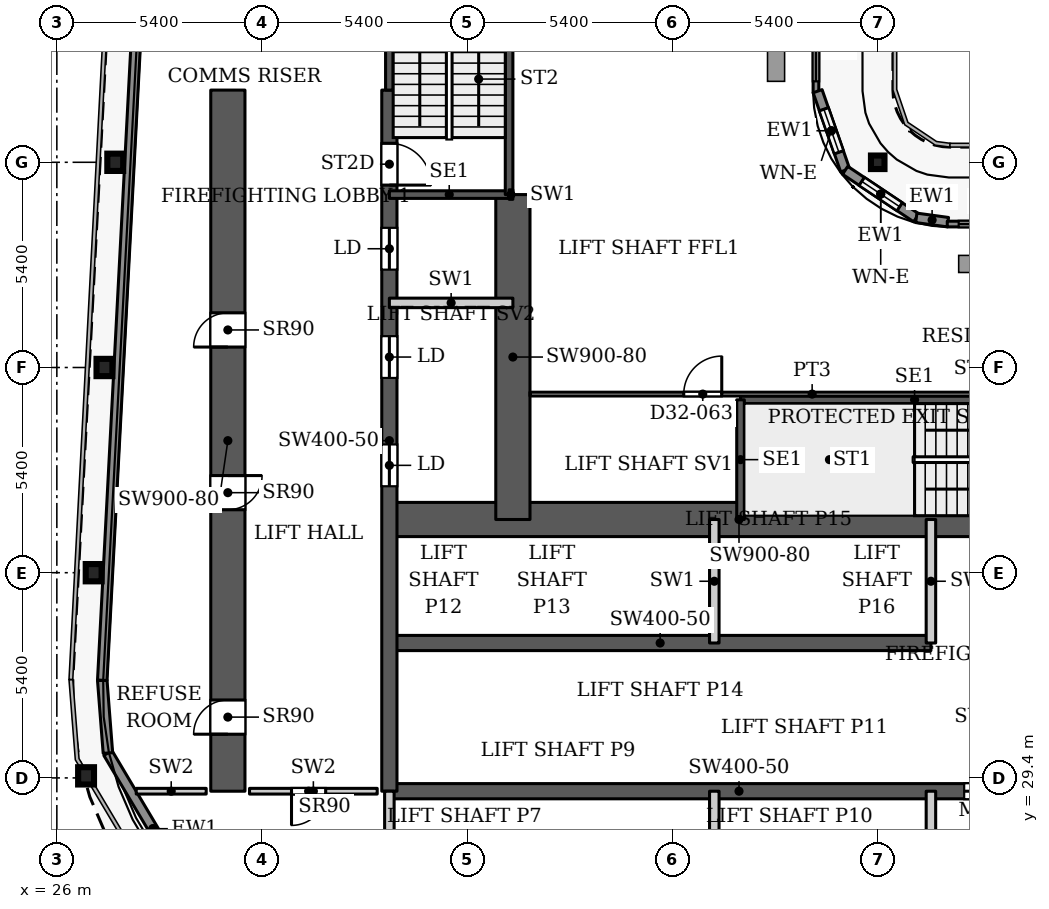
"""IFC4 building model, lengths in metres.
Left out: names, types, materials, properties, quantities, classifications, styles, units other than length and angle.
Written with IfcOpenShell. Run it as: python <this file> out.ifc"""

import sys

from ifc_helpers import new_model, si_unit, direction, frame, frame_2d, origin, origin_2d, place, context, subcontext, project, spatial, rectangle, hollow_rectangle, i_section, extrude, source, transform, mapped, element, fill, save


model = new_model("IFC4")
c1 = context("Model", 3, precision=1e-05, world=origin(), true_north=direction((0.0, 1.0)))
c2 = subcontext(c1, "Body", "Model", "MODEL_VIEW")
j1 = project(units=[si_unit("LENGTHUNIT", "METRE"), si_unit("PLANEANGLEUNIT", "RADIAN")], contexts=[c1])
p1 = place(None, origin())
s1 = spatial("IfcSite", under=j1, at=p1, CompositionType="ELEMENT")
p2 = place(p1, origin())
s2 = spatial("IfcBuilding", under=s1, at=p2, CompositionType="ELEMENT")
p3 = place(p2, frame((0.0, 0.0, 137.0)))
s3 = spatial("IfcBuildingStorey", under=s2, at=p3, CompositionType="ELEMENT", Elevation=137.0)
for number, where, z_axis, x_axis in (
    (1, (26.769, 29.454, 0.0), (0.0, 0.0, 1.0), (1.0, 0.0, 0.0)),
    (2, (26.969, 34.8, 0.0), (0.0, 0.0, 1.0), (1.0, 0.0, 0.0)),
    (3, (27.253, 40.2, 0.0), (0.0, 0.0, 1.0), (1.0, 0.0, 0.0)),
    (4, (27.537, 45.6, 0.0), (0.0, 0.0, 1.0), (1.0, 0.0, 0.0)),
):
    element("IfcColumn", number, at=place(p3, frame(where, z_axis=z_axis, x_axis=x_axis)), inside=s3, PredefinedType="COLUMN", context=c2, shape_type="SweptSolid", body=[
        extrude(i_section(OverallWidth=0.418, OverallDepth=0.455, WebThickness=0.042, FlangeThickness=0.068, FilletRadius=0.014, at=origin_2d()), origin(), (0.0, 0.0, 1.0), 3.9),
    ])
p4 = place(p3, frame((47.6, 45.6, 0.0), z_axis=(0.0, 0.0, 1.0), x_axis=(1.0, 0.0, 0.0)))
e5 = element("IfcColumn", 5, at=p4, inside=s3, PredefinedType="COLUMN", context=c2, shape_type="SweptSolid", body=[
    extrude(hollow_rectangle(XDim=0.356, YDim=0.356, WallThickness=0.016, InnerFilletRadius=0.016, OuterFilletRadius=0.032, at=origin_2d()), origin(), (0.0, 0.0, 1.0), 3.9),
])
p5 = place(p3, frame((34.75, 29.05, 0.0), z_axis=(0.0, 0.0, 1.0), x_axis=(1.0, 0.0, 0.0)))
e6 = element("IfcWall", 6, at=p5, inside=s3, PredefinedType="SHEAR", context=c2, shape_type="SweptSolid", body=[
    extrude(rectangle(XDim=18.4, YDim=0.4, at=frame_2d((9.2, 0.0))), origin(), (0.0, 0.0, 1.0), 3.9),
])
p6 = place(p5, frame((15.125, 0.0, 0.0)))
e7 = element("IfcOpeningElement", 7, at=p6, cuts=e6, PredefinedType="OPENING", context=c2, shape_type="SweptSolid", body=[
    extrude(rectangle(XDim=1.1, YDim=2.2, at=frame_2d((0.55, 1.1))), frame((0.0, 0.21, 0.0), z_axis=(0.0, -1.0, 0.0), x_axis=(1.0, 0.0, 0.0)), (0.0, 0.0, 1.0), 0.42),
])
p7 = place(p3, frame((34.75, 32.95, 0.0), z_axis=(0.0, 0.0, 1.0), x_axis=(1.0, 0.0, 0.0)))
e8 = element("IfcWall", 8, at=p7, inside=s3, PredefinedType="SHEAR", context=c2, shape_type="SweptSolid", body=[
    extrude(rectangle(XDim=14.25, YDim=0.4, at=frame_2d((7.125, 0.0))), origin(), (0.0, 0.0, 1.0), 3.9),
])
p8 = place(p3, frame((34.75, 36.2, 0.0), z_axis=(0.0, 0.0, 1.0), x_axis=(1.0, 0.0, 0.0)))
e9 = element("IfcWall", 9, at=p8, inside=s3, PredefinedType="SHEAR", context=c2, shape_type="SweptSolid", body=[
    extrude(rectangle(XDim=18.4, YDim=0.9, at=frame_2d((9.2, 0.0))), origin(), (0.0, 0.0, 1.0), 3.9),
])
p9 = place(p8, frame((16.9, 0.0, 0.0)))
e10 = element("IfcOpeningElement", 10, at=p9, cuts=e9, PredefinedType="OPENING", context=c2, shape_type="SweptSolid", body=[
    extrude(rectangle(XDim=1.0, YDim=2.2, at=frame_2d((0.5, 1.1))), frame((0.0, 0.46, 0.0), z_axis=(0.0, -1.0, 0.0), x_axis=(1.0, 0.0, 0.0)), (0.0, 0.0, 1.0), 0.92),
])
p10 = place(p3, frame((34.75, 29.05, 0.0), z_axis=(0.0, 0.0, 1.0), x_axis=(0.0, 1.0, 0.0)))
e11 = element("IfcWall", 11, at=p10, inside=s3, PredefinedType="SHEAR", context=c2, shape_type="SweptSolid", body=[
    extrude(rectangle(XDim=18.45, YDim=0.4, at=frame_2d((9.225, 0.0))), origin(), (0.0, 0.0, 1.0), 3.9),
])
p11 = place(p10, frame((8.025, 0.0, 0.0)))
e12 = element("IfcOpeningElement", 12, at=p11, cuts=e11, PredefinedType="OPENING", context=c2, shape_type="SweptSolid", body=[
    extrude(rectangle(XDim=1.1, YDim=2.2, at=frame_2d((0.55, 1.1))), frame((0.0, 0.21, 0.0), z_axis=(0.0, -1.0, 0.0), x_axis=(1.0, 0.0, 0.0)), (0.0, 0.0, 1.0), 0.42),
])
p12 = place(p10, frame((10.875, 0.0, 0.0)))
e13 = element("IfcOpeningElement", 13, at=p12, cuts=e11, PredefinedType="OPENING", context=c2, shape_type="SweptSolid", body=[
    extrude(rectangle(XDim=1.1, YDim=2.2, at=frame_2d((0.55, 1.1))), frame((0.0, 0.21, 0.0), z_axis=(0.0, -1.0, 0.0), x_axis=(1.0, 0.0, 0.0)), (0.0, 0.0, 1.0), 0.42),
])
p13 = place(p10, frame((13.725, 0.0, 0.0)))
e14 = element("IfcOpeningElement", 14, at=p13, cuts=e11, PredefinedType="OPENING", context=c2, shape_type="SweptSolid", body=[
    extrude(rectangle(XDim=1.1, YDim=2.2, at=frame_2d((0.55, 1.1))), frame((0.0, 0.21, 0.0), z_axis=(0.0, -1.0, 0.0), x_axis=(1.0, 0.0, 0.0)), (0.0, 0.0, 1.0), 0.42),
])
p14 = place(p10, frame((15.95, 0.0, 0.0)))
e15 = element("IfcOpeningElement", 15, at=p14, cuts=e11, PredefinedType="OPENING", context=c2, shape_type="SweptSolid", body=[
    extrude(rectangle(XDim=1.1, YDim=2.2, at=frame_2d((0.55, 1.1))), frame((0.0, 0.21, 0.0), z_axis=(0.0, -1.0, 0.0), x_axis=(1.0, 0.0, 0.0)), (0.0, 0.0, 1.0), 0.42),
])
p15 = place(p3, frame((38.0, 36.2, 0.0), z_axis=(0.0, 0.0, 1.0), x_axis=(0.0, 1.0, 0.0)))
e16 = element("IfcWall", 16, at=p15, inside=s3, PredefinedType="SHEAR", context=c2, shape_type="SweptSolid", body=[
    extrude(rectangle(XDim=8.55, YDim=0.9, at=frame_2d((4.275, 0.0))), origin(), (0.0, 0.0, 1.0), 3.9),
])
p16 = place(p3, frame((30.5, 29.05, 0.0), z_axis=(0.0, 0.0, 1.0), x_axis=(0.0, 1.0, 0.0)))
e17 = element("IfcWall", 17, at=p16, inside=s3, PredefinedType="SHEAR", context=c2, shape_type="SweptSolid", body=[
    extrude(rectangle(XDim=18.45, YDim=0.9, at=frame_2d((9.225, 0.0))), origin(), (0.0, 0.0, 1.0), 3.9),
])
p17 = place(p16, frame((1.5, 0.0, 0.0)))
e18 = element("IfcOpeningElement", 18, at=p17, cuts=e17, PredefinedType="OPENING", context=c2, shape_type="SweptSolid", body=[
    extrude(rectangle(XDim=0.9, YDim=2.2, at=frame_2d((0.45, 1.1))), frame((0.0, 0.46, 0.0), z_axis=(0.0, -1.0, 0.0), x_axis=(1.0, 0.0, 0.0)), (0.0, 0.0, 1.0), 0.92),
])
p18 = place(p16, frame((7.406, 0.0, 0.0)))
e19 = element("IfcOpeningElement", 19, at=p18, cuts=e17, PredefinedType="OPENING", context=c2, shape_type="SweptSolid", body=[
    extrude(rectangle(XDim=0.9, YDim=2.2, at=frame_2d((0.45, 1.1))), frame((0.0, 0.46, 0.0), z_axis=(0.0, -1.0, 0.0), x_axis=(1.0, 0.0, 0.0)), (0.0, 0.0, 1.0), 0.92),
])
p19 = place(p16, frame((11.688, 0.0, 0.0)))
e20 = element("IfcOpeningElement", 20, at=p19, cuts=e17, PredefinedType="OPENING", context=c2, shape_type="SweptSolid", body=[
    extrude(rectangle(XDim=0.9, YDim=2.2, at=frame_2d((0.45, 1.1))), frame((0.0, 0.46, 0.0), z_axis=(0.0, -1.0, 0.0), x_axis=(1.0, 0.0, 0.0)), (0.0, 0.0, 1.0), 0.92),
])
p20 = place(p3, frame((29.712, 26.072, 0.0), z_axis=(0.0, 0.0, 1.0), x_axis=(-0.511028049012, 0.859564036662, 0.0)))
e21 = element("IfcWall", 21, at=p20, inside=s3, PredefinedType="SOLIDWALL", context=c2, shape_type="SweptSolid", body=[
    extrude(rectangle(XDim=4.634, YDim=0.25, at=frame_2d((2.317, 0.0))), origin(), (0.0, 0.0, 1.0), 3.147),
])
p21 = place(p3, frame((27.344, 30.055, 0.0), z_axis=(0.0, 0.0, 1.0), x_axis=(-0.077571675317, 0.99698677784, 0.0)))
e22 = element("IfcWall", 22, at=p21, inside=s3, PredefinedType="SOLIDWALL", context=c2, shape_type="SweptSolid", body=[
    extrude(rectangle(XDim=1.92, YDim=0.25, at=frame_2d((0.96, 0.0))), origin(), (0.0, 0.0, 1.0), 3.75),
])
p22 = place(p3, frame((27.195, 31.969, 0.0), z_axis=(0.0, 0.0, 1.0), x_axis=(0.052554995867, 0.998618031286, 0.0)))
e23 = element("IfcWall", 23, at=p22, inside=s3, PredefinedType="SOLIDWALL", context=c2, shape_type="SweptSolid", body=[
    extrude(rectangle(XDim=66.787, YDim=0.25, at=frame_2d((33.394, 0.0))), origin(), (0.0, 0.0, 1.0), 3.75),
])
p23 = place(p3, frame((45.975, 49.83, 0.0), z_axis=(0.0, 0.0, 1.0), x_axis=(0.0, -1.0, 0.0)))
e24 = element("IfcWall", 24, at=p23, inside=s3, PredefinedType="SOLIDWALL", context=c2, shape_type="SweptSolid", body=[
    extrude(rectangle(XDim=2.4, YDim=0.15, at=frame_2d((1.2, 0.0))), origin(), (0.0, 0.0, 1.0), 3.75),
])
p24 = place(p23, frame((0.3, 0.0, 0.0)))
e25 = element("IfcOpeningElement", 25, at=p24, cuts=e24, PredefinedType="OPENING", context=c2, shape_type="SweptSolid", body=[
    extrude(rectangle(XDim=1.8, YDim=2.4, at=frame_2d((0.9, 1.2))), frame((0.0, 0.085, 0.0), z_axis=(0.0, -1.0, 0.0), x_axis=(1.0, 0.0, 0.0)), (0.0, 0.0, 1.0), 0.17),
])
p25 = place(p3, frame((46.018, 47.471, 0.0), z_axis=(0.0, 0.0, 1.0), x_axis=(0.328791208903, -0.944402637093, 0.0)))
e26 = element("IfcWall", 26, at=p25, inside=s3, PredefinedType="SOLIDWALL", context=c2, shape_type="SweptSolid", body=[
    extrude(rectangle(XDim=2.205, YDim=0.25, at=frame_2d((1.102, 0.0))), origin(), (0.0, 0.0, 1.0), 3.75),
])
p26 = place(p25, frame((0.503, 0.0, 0.6)))
e27 = element("IfcOpeningElement", 27, at=p26, cuts=e26, PredefinedType="OPENING", context=c2, shape_type="SweptSolid", body=[
    extrude(rectangle(XDim=1.2, YDim=2.1, at=frame_2d((0.6, 1.05))), frame((0.0, 0.135, 0.0), z_axis=(0.0, -1.0, 0.0), x_axis=(1.0, 0.0, 0.0)), (0.0, 0.0, 1.0), 0.27),
])
p27 = place(p3, frame((46.743, 45.389, 0.0), z_axis=(0.0, 0.0, 1.0), x_axis=(0.831449265529, -0.555600682912, 0.0)))
e28 = element("IfcWall", 28, at=p27, inside=s3, PredefinedType="SOLIDWALL", context=c2, shape_type="SweptSolid", body=[
    extrude(rectangle(XDim=2.251, YDim=0.25, at=frame_2d((1.126, 0.0))), origin(), (0.0, 0.0, 1.0), 3.75),
])
p28 = place(p27, frame((0.525, 0.0, 0.6)))
e29 = element("IfcOpeningElement", 29, at=p28, cuts=e28, PredefinedType="OPENING", context=c2, shape_type="SweptSolid", body=[
    extrude(rectangle(XDim=1.2, YDim=2.1, at=frame_2d((0.6, 1.05))), frame((0.0, 0.135, 0.0), z_axis=(0.0, -1.0, 0.0), x_axis=(1.0, 0.0, 0.0)), (0.0, 0.0, 1.0), 0.27),
])
p29 = place(p3, frame((48.615, 44.138, 0.0), z_axis=(0.0, 0.0, 1.0), x_axis=(0.990741504246, -0.135761819977, 0.0)))
e30 = element("IfcWall", 30, at=p29, inside=s3, PredefinedType="SOLIDWALL", context=c2, shape_type="SweptSolid", body=[
    extrude(rectangle(XDim=0.84, YDim=0.25, at=frame_2d((0.42, 0.0))), origin(), (0.0, 0.0, 1.0), 3.75),
])
p30 = place(p3, frame((49.43, 43.975, 0.0), z_axis=(0.0, 0.0, 1.0), x_axis=(1.0, 0.0, 0.0)))
e31 = element("IfcWall", 31, at=p30, inside=s3, PredefinedType="SOLIDWALL", context=c2, shape_type="SweptSolid", body=[
    extrude(rectangle(XDim=2.4, YDim=0.15, at=frame_2d((1.2, 0.0))), origin(), (0.0, 0.0, 1.0), 3.75),
])
p31 = place(p30, frame((0.3, 0.0, 0.0)))
e32 = element("IfcOpeningElement", 32, at=p31, cuts=e31, PredefinedType="OPENING", context=c2, shape_type="SweptSolid", body=[
    extrude(rectangle(XDim=1.8, YDim=2.4, at=frame_2d((0.9, 1.2))), frame((0.0, 0.085, 0.0), z_axis=(0.0, -1.0, 0.0), x_axis=(1.0, 0.0, 0.0)), (0.0, 0.0, 1.0), 0.17),
])
p32 = place(p3, frame((43.99, 39.35, 0.0), z_axis=(0.0, 0.0, 1.0), x_axis=(1.0, 0.0, 0.0)))
e33 = element("IfcWall", 33, at=p32, inside=s3, PredefinedType="SHEAR", context=c2, shape_type="SweptSolid", body=[
    extrude(rectangle(XDim=9.16, YDim=0.2, at=frame_2d((4.58, 0.0))), origin(), (0.0, 0.0, 1.0), 3.9),
])
p33 = place(p3, frame((43.99, 36.2, 0.0), z_axis=(0.0, 0.0, 1.0), x_axis=(0.0, 1.0, 0.0)))
e34 = element("IfcWall", 34, at=p33, inside=s3, PredefinedType="SHEAR", context=c2, shape_type="SweptSolid", body=[
    extrude(rectangle(XDim=3.15, YDim=0.2, at=frame_2d((1.575, 0.0))), origin(), (0.0, 0.0, 1.0), 3.9),
])
p34 = place(p3, frame((34.75, 44.75, 0.0), z_axis=(0.0, 0.0, 1.0), x_axis=(1.0, 0.0, 0.0)))
e35 = element("IfcWall", 35, at=p34, inside=s3, PredefinedType="SHEAR", context=c2, shape_type="SweptSolid", body=[
    extrude(rectangle(XDim=3.15, YDim=0.2, at=frame_2d((1.575, 0.0))), origin(), (0.0, 0.0, 1.0), 3.9),
])
p35 = place(p3, frame((34.75, 47.5, 0.0), z_axis=(0.0, 0.0, 1.0), x_axis=(0.0, 1.0, 0.0)))
e36 = element("IfcWall", 36, at=p35, inside=s3, PredefinedType="SHEAR", context=c2, shape_type="SweptSolid", body=[
    extrude(rectangle(XDim=6.41, YDim=0.2, at=frame_2d((3.205, 0.0))), origin(), (0.0, 0.0, 1.0), 3.9),
])
p36 = place(p3, frame((37.9, 44.75, 0.0), z_axis=(0.0, 0.0, 1.0), x_axis=(0.0, 1.0, 0.0)))
e37 = element("IfcWall", 37, at=p36, inside=s3, PredefinedType="SHEAR", context=c2, shape_type="SweptSolid", body=[
    extrude(rectangle(XDim=9.16, YDim=0.2, at=frame_2d((4.58, 0.0))), origin(), (0.0, 0.0, 1.0), 3.9),
])
for number, where, z_axis, x_axis in (
    (38, (34.75, 25.8, 0.0), (0.0, 0.0, 1.0), (0.0, 1.0, 0.0)),
    (39, (43.3, 25.8, 0.0), (0.0, 0.0, 1.0), (0.0, 1.0, 0.0)),
    (40, (43.3, 32.95, 0.0), (0.0, 0.0, 1.0), (0.0, 1.0, 0.0)),
    (41, (49.0, 25.8, 0.0), (0.0, 0.0, 1.0), (0.0, 1.0, 0.0)),
    (42, (49.0, 32.95, 0.0), (0.0, 0.0, 1.0), (0.0, 1.0, 0.0)),
    (43, (34.75, 41.9, 0.0), (0.0, 0.0, 1.0), (1.0, 0.0, 0.0)),
):
    element("IfcWall", number, at=place(p3, frame(where, z_axis=z_axis, x_axis=x_axis)), inside=s3, PredefinedType="PARTITIONING", context=c2, shape_type="SweptSolid", body=[
        extrude(rectangle(XDim=3.25, YDim=0.25, at=frame_2d((1.625, 0.0))), origin(), (0.0, 0.0, 1.0), 3.9),
    ])
p37 = place(p3, frame((37.9, 44.75, 0.0), z_axis=(0.0, 0.0, 1.0), x_axis=(1.0, 0.0, 0.0)))
e44 = element("IfcWall", 44, at=p37, inside=s3, PredefinedType="PARTITIONING", context=c2, shape_type="SweptSolid", body=[
    extrude(rectangle(XDim=0.1, YDim=0.25, at=frame_2d((0.05, 0.0))), origin(), (0.0, 0.0, 1.0), 3.9),
])
p38 = place(p3, frame((28.089, 29.05, 0.0), z_axis=(0.0, 0.0, 1.0), x_axis=(1.0, 0.0, 0.0)))
e45 = element("IfcWall", 45, at=p38, inside=s3, PredefinedType="PARTITIONING", context=c2, shape_type="SweptSolid", body=[
    extrude(rectangle(XDim=1.841, YDim=0.15, at=frame_2d((0.92, 0.0))), origin(), (0.0, 0.0, 1.0), 3.9),
])
p39 = place(p3, frame((31.07, 29.05, 0.0), z_axis=(0.0, 0.0, 1.0), x_axis=(1.0, 0.0, 0.0)))
e46 = element("IfcWall", 46, at=p39, inside=s3, PredefinedType="PARTITIONING", context=c2, shape_type="SweptSolid", body=[
    extrude(rectangle(XDim=3.36, YDim=0.15, at=frame_2d((1.68, 0.0))), origin(), (0.0, 0.0, 1.0), 3.9),
])
p40 = place(p39, frame((1.105, 0.0, 0.0)))
e47 = element("IfcOpeningElement", 47, at=p40, cuts=e46, PredefinedType="OPENING", context=c2, shape_type="SweptSolid", body=[
    extrude(rectangle(XDim=0.9, YDim=2.2, at=frame_2d((0.45, 1.1))), frame((0.0, 0.085, 0.0), z_axis=(0.0, -1.0, 0.0), x_axis=(1.0, 0.0, 0.0)), (0.0, 0.0, 1.0), 0.17),
])
p41 = place(p3, frame((38.449, 39.5, 0.0), z_axis=(0.0, 0.0, 1.0), x_axis=(1.0, 0.0, 0.0)))
e48 = element("IfcWall", 48, at=p41, inside=s3, PredefinedType="PARTITIONING", context=c2, shape_type="SweptSolid", body=[
    extrude(rectangle(XDim=14.851, YDim=0.1, at=frame_2d((7.426, 0.0))), origin(), (0.0, 0.0, 1.0), 3.6),
])
p42 = place(p41, frame((4.047, 0.0, 0.0)))
e49 = element("IfcOpeningElement", 49, at=p42, cuts=e48, PredefinedType="OPENING", context=c2, shape_type="SweptSolid", body=[
    extrude(rectangle(XDim=1.0, YDim=2.1, at=frame_2d((0.5, 1.05))), frame((0.0, 0.06, 0.0), z_axis=(0.0, -1.0, 0.0), x_axis=(1.0, 0.0, 0.0)), (0.0, 0.0, 1.0), 0.12),
])
m1 = source(origin(), c2, "Body", "SweptSolid", [
    extrude(rectangle(XDim=1.8, YDim=2.4, at=frame_2d((0.9, 1.2))), frame((0.0, 0.025, 0.0), z_axis=(0.0, -1.0, 0.0), x_axis=(1.0, 0.0, 0.0)), (0.0, 0.0, 1.0), 0.05),
])
p43 = place(p24, origin())
e50 = element("IfcDoor", 50, at=p43, inside=s3, OperationType="SLIDING_TO_LEFT", PredefinedType="DOOR", context=c2, shape_type="MappedRepresentation", body=[
    mapped(m1, transform((0.0, 0.0, 0.0), x_axis=(1.0, 0.0, 0.0), y_axis=(0.0, 1.0, 0.0), z_axis=(0.0, 0.0, 1.0), scale=1.0)),
])
fill(e25, e50)
m2 = source(origin(), c2, "Body", "SweptSolid", [
    extrude(rectangle(XDim=1.2, YDim=2.1, at=frame_2d((0.6, 1.05))), frame((0.0, 0.03, 0.0), z_axis=(0.0, -1.0, 0.0), x_axis=(1.0, 0.0, 0.0)), (0.0, 0.0, 1.0), 0.06),
])
p44 = place(p26, origin())
e51 = element("IfcWindow", 51, at=p44, inside=s3, PartitioningType="SINGLE_PANEL", PredefinedType="WINDOW", context=c2, shape_type="MappedRepresentation", body=[
    mapped(m2, transform((0.0, 0.0, 0.0), x_axis=(1.0, 0.0, 0.0), y_axis=(0.0, 1.0, 0.0), z_axis=(0.0, 0.0, 1.0), scale=1.0)),
])
fill(e27, e51)
p45 = place(p28, origin())
e52 = element("IfcWindow", 52, at=p45, inside=s3, PartitioningType="SINGLE_PANEL", PredefinedType="WINDOW", context=c2, shape_type="MappedRepresentation", body=[
    mapped(m2, transform((0.0, 0.0, 0.0), x_axis=(1.0, 0.0, 0.0), y_axis=(0.0, 1.0, 0.0), z_axis=(0.0, 0.0, 1.0), scale=1.0)),
])
fill(e29, e52)
p46 = place(p31, origin())
e53 = element("IfcDoor", 53, at=p46, inside=s3, OperationType="SLIDING_TO_LEFT", PredefinedType="DOOR", context=c2, shape_type="MappedRepresentation", body=[
    mapped(m1, transform((0.0, 0.0, 0.0), x_axis=(1.0, 0.0, 0.0), y_axis=(0.0, 1.0, 0.0), z_axis=(0.0, 0.0, 1.0), scale=1.0)),
])
fill(e32, e53)
m3 = source(origin(), c2, "Body", "SweptSolid", [
    extrude(rectangle(XDim=1.1, YDim=2.2, at=frame_2d((0.55, 1.1))), frame((0.0, 0.025, 0.0), z_axis=(0.0, -1.0, 0.0), x_axis=(1.0, 0.0, 0.0)), (0.0, 0.0, 1.0), 0.05),
])
p47 = place(p11, origin())
e54 = element("IfcDoor", 54, at=p47, inside=s3, OperationType="SLIDING_TO_LEFT", PredefinedType="DOOR", context=c2, shape_type="MappedRepresentation", body=[
    mapped(m3, transform((0.0, 0.0, 0.0), x_axis=(1.0, 0.0, 0.0), y_axis=(0.0, 1.0, 0.0), z_axis=(0.0, 0.0, 1.0), scale=1.0)),
])
fill(e12, e54)
p48 = place(p12, origin())
e55 = element("IfcDoor", 55, at=p48, inside=s3, OperationType="SLIDING_TO_LEFT", PredefinedType="DOOR", context=c2, shape_type="MappedRepresentation", body=[
    mapped(m3, transform((0.0, 0.0, 0.0), x_axis=(1.0, 0.0, 0.0), y_axis=(0.0, 1.0, 0.0), z_axis=(0.0, 0.0, 1.0), scale=1.0)),
])
fill(e13, e55)
p49 = place(p13, origin())
e56 = element("IfcDoor", 56, at=p49, inside=s3, OperationType="SLIDING_TO_LEFT", PredefinedType="DOOR", context=c2, shape_type="MappedRepresentation", body=[
    mapped(m3, transform((0.0, 0.0, 0.0), x_axis=(1.0, 0.0, 0.0), y_axis=(0.0, 1.0, 0.0), z_axis=(0.0, 0.0, 1.0), scale=1.0)),
])
fill(e14, e56)
p50 = place(p6, origin())
e57 = element("IfcDoor", 57, at=p50, inside=s3, OperationType="SLIDING_TO_LEFT", PredefinedType="DOOR", context=c2, shape_type="MappedRepresentation", body=[
    mapped(m3, transform((0.0, 0.0, 0.0), x_axis=(1.0, 0.0, 0.0), y_axis=(0.0, 1.0, 0.0), z_axis=(0.0, 0.0, 1.0), scale=1.0)),
])
fill(e7, e57)
m4 = source(origin(), c2, "Body", "SweptSolid", [
    extrude(rectangle(XDim=0.9, YDim=2.2, at=frame_2d((0.45, 1.1))), frame((0.0, 0.025, 0.0), z_axis=(0.0, -1.0, 0.0), x_axis=(1.0, 0.0, 0.0)), (0.0, 0.0, 1.0), 0.05),
])
p51 = place(p17, origin())
e58 = element("IfcDoor", 58, at=p51, inside=s3, OperationType="SINGLE_SWING_LEFT", PredefinedType="DOOR", context=c2, shape_type="MappedRepresentation", body=[
    mapped(m4, transform((0.0, 0.0, 0.0), x_axis=(1.0, 0.0, 0.0), y_axis=(0.0, 1.0, 0.0), z_axis=(0.0, 0.0, 1.0), scale=1.0)),
])
fill(e18, e58)
p52 = place(p18, origin())
e59 = element("IfcDoor", 59, at=p52, inside=s3, OperationType="SINGLE_SWING_RIGHT", PredefinedType="DOOR", context=c2, shape_type="MappedRepresentation", body=[
    mapped(m4, transform((0.0, 0.0, 0.0), x_axis=(1.0, 0.0, 0.0), y_axis=(0.0, 1.0, 0.0), z_axis=(0.0, 0.0, 1.0), scale=1.0)),
])
fill(e19, e59)
p53 = place(p19, origin())
e60 = element("IfcDoor", 60, at=p53, inside=s3, OperationType="SINGLE_SWING_LEFT", PredefinedType="DOOR", context=c2, shape_type="MappedRepresentation", body=[
    mapped(m4, transform((0.0, 0.0, 0.0), x_axis=(1.0, 0.0, 0.0), y_axis=(0.0, 1.0, 0.0), z_axis=(0.0, 0.0, 1.0), scale=1.0)),
])
fill(e20, e60)
p54 = place(p40, origin())
e61 = element("IfcDoor", 61, at=p54, inside=s3, OperationType="SINGLE_SWING_RIGHT", PredefinedType="DOOR", context=c2, shape_type="MappedRepresentation", body=[
    mapped(m4, transform((0.0, 0.0, 0.0), x_axis=(1.0, 0.0, 0.0), y_axis=(0.0, 1.0, 0.0), z_axis=(0.0, 0.0, 1.0), scale=1.0)),
])
fill(e47, e61)
m5 = source(origin(), c2, "Body", "SweptSolid", [
    extrude(rectangle(XDim=1.1, YDim=2.2, at=frame_2d((0.55, 1.1))), frame((0.0, 0.025, 0.0), z_axis=(0.0, -1.0, 0.0), x_axis=(1.0, 0.0, 0.0)), (0.0, 0.0, 1.0), 0.05),
])
p55 = place(p14, origin())
e62 = element("IfcDoor", 62, at=p55, inside=s3, OperationType="SINGLE_SWING_RIGHT", PredefinedType="DOOR", context=c2, shape_type="MappedRepresentation", body=[
    mapped(m5, transform((0.0, 0.0, 0.0), x_axis=(1.0, 0.0, 0.0), y_axis=(0.0, 1.0, 0.0), z_axis=(0.0, 0.0, 1.0), scale=1.0)),
])
fill(e15, e62)
m6 = source(origin(), c2, "Body", "SweptSolid", [
    extrude(rectangle(XDim=1.0, YDim=2.1, at=frame_2d((0.5, 1.05))), frame((0.0, 0.025, 0.0), z_axis=(0.0, -1.0, 0.0), x_axis=(1.0, 0.0, 0.0)), (0.0, 0.0, 1.0), 0.05),
])
p56 = place(p42, origin())
e63 = element("IfcDoor", 63, at=p56, inside=s3, OperationType="SINGLE_SWING_LEFT", PredefinedType="DOOR", context=c2, shape_type="MappedRepresentation", body=[
    mapped(m6, transform((0.0, 0.0, 0.0), x_axis=(1.0, 0.0, 0.0), y_axis=(0.0, 1.0, 0.0), z_axis=(0.0, 0.0, 1.0), scale=1.0)),
])
fill(e49, e63)
save(model, sys.argv[1])
